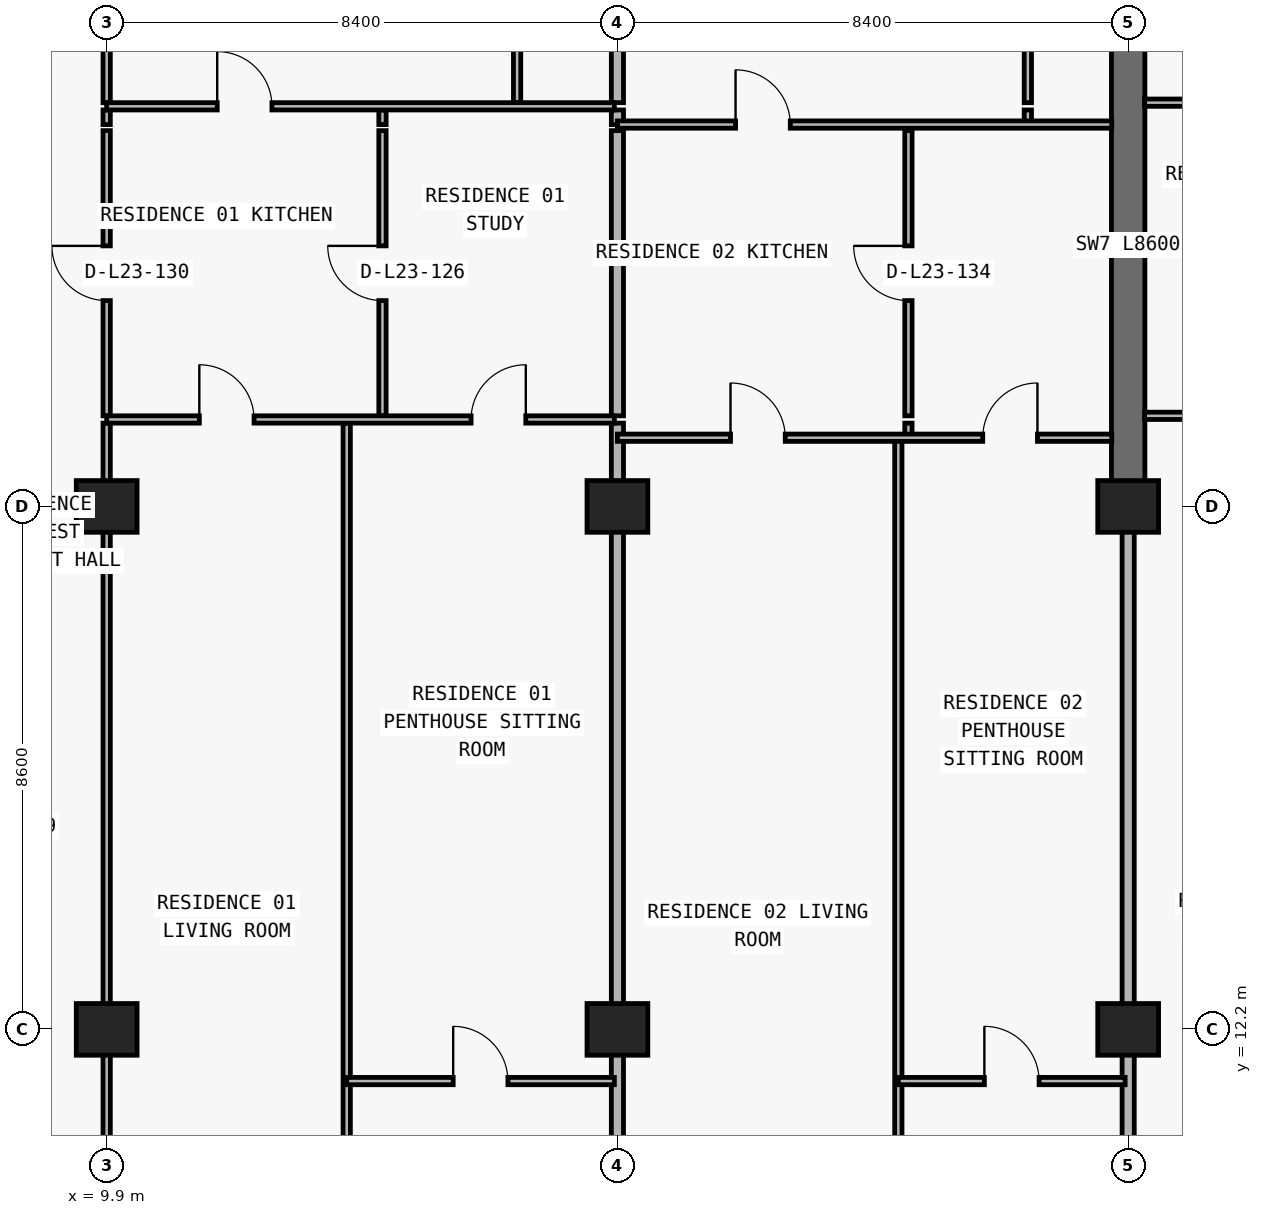
"""IFC4 building model, lengths in metres.
Left out: names, types, materials, properties, quantities, classifications, styles, units other than length and angle.
Written with IfcOpenShell. Run it as: python <this file> out.ifc"""

import sys

from ifc_helpers import new_model, si_unit, direction, frame, frame_2d, origin, origin_2d, place, context, subcontext, project, spatial, rectangle, extrude, element, fill, save


model = new_model("IFC4")
c1 = context("Model", 3, precision=1e-05, world=origin(), true_north=direction((0.0, 1.0)))
c2 = subcontext(c1, "Body", "Model", "MODEL_VIEW")
j1 = project(units=[si_unit("LENGTHUNIT", "METRE"), si_unit("PLANEANGLEUNIT", "RADIAN")], contexts=[c1])
p1 = place(None, origin())
s1 = spatial("IfcSite", under=j1, at=p1, CompositionType="ELEMENT")
p2 = place(p1, origin())
s2 = spatial("IfcBuilding", under=s1, at=p2, CompositionType="ELEMENT")
p3 = place(p2, frame((0.0, 0.0, 87.9)))
s3 = spatial("IfcBuildingStorey", under=s2, at=p3, CompositionType="ELEMENT", Elevation=87.9)
for number, where, z_axis, x_axis in (
    (1, (9.9, 12.2, 0.0), (0.0, 0.0, 1.0), (1.0, 0.0, 0.0)),
    (2, (18.3, 12.2, 0.0), (0.0, 0.0, 1.0), (1.0, 0.0, 0.0)),
    (3, (26.7, 12.2, 0.0), (0.0, 0.0, 1.0), (1.0, 0.0, 0.0)),
    (4, (9.9, 20.8, 0.0), (0.0, 0.0, 1.0), (1.0, 0.0, 0.0)),
    (5, (18.3, 20.8, 0.0), (0.0, 0.0, 1.0), (1.0, 0.0, 0.0)),
    (6, (26.7, 20.8, 0.0), (0.0, 0.0, 1.0), (1.0, 0.0, 0.0)),
):
    element("IfcColumn", number, at=place(p3, frame(where, z_axis=z_axis, x_axis=x_axis)), inside=s3, PredefinedType="COLUMN", context=c2, shape_type="SweptSolid", body=[
        extrude(rectangle(XDim=1.0, YDim=0.85, at=origin_2d()), origin(), (0.0, 0.0, 1.0), 3.05),
    ])
p4 = place(p3, frame((26.7, 20.8, 0.0), z_axis=(0.0, 0.0, 1.0), x_axis=(0.0, 1.0, 0.0)))
e7 = element("IfcWall", 7, at=p4, inside=s3, PredefinedType="SHEAR", context=c2, shape_type="SweptSolid", body=[
    extrude(rectangle(XDim=8.6, YDim=0.55, at=frame_2d((4.3, 0.0))), origin(), (0.0, 0.0, 1.0), 3.05),
])
p5 = place(p3, frame((9.9, 8.84, 0.0), z_axis=(0.0, 0.0, 1.0), x_axis=(0.0, 1.0, 0.0)))
e8 = element("IfcWall", 8, at=p5, inside=s3, PredefinedType="PARTITIONING", context=c2, shape_type="SweptSolid", body=[
    extrude(rectangle(XDim=13.33, YDim=0.12, at=frame_2d((6.665, 0.0))), origin(), (0.0, 0.0, 1.0), 2.174),
])
p6 = place(p3, frame((9.9, 22.29, 0.0), z_axis=(0.0, 0.0, 1.0), x_axis=(0.0, 1.0, 0.0)))
e9 = element("IfcWall", 9, at=p6, inside=s3, PredefinedType="PARTITIONING", context=c2, shape_type="SweptSolid", body=[
    extrude(rectangle(XDim=4.69, YDim=0.12, at=frame_2d((2.345, 0.0))), origin(), (0.0, 0.0, 1.0), 2.174),
])
p7 = place(p6, frame((1.895, 0.0, 0.0)))
e10 = element("IfcOpeningElement", 10, at=p7, cuts=e9, PredefinedType="OPENING", context=c2, shape_type="SweptSolid", body=[
    extrude(rectangle(XDim=0.9, YDim=2.124, at=frame_2d((0.45, 1.062))), frame((0.0, 0.07, 0.0), z_axis=(0.0, -1.0, 0.0), x_axis=(1.0, 0.0, 0.0)), (0.0, 0.0, 1.0), 0.14),
])
p8 = place(p3, frame((9.9, 27.08, 0.0), z_axis=(0.0, 0.0, 1.0), x_axis=(0.0, 1.0, 0.0)))
e11 = element("IfcWall", 11, at=p8, inside=s3, PredefinedType="PARTITIONING", context=c2, shape_type="SweptSolid", body=[
    extrude(rectangle(XDim=0.24, YDim=0.12, at=frame_2d((0.12, 0.0))), origin(), (0.0, 0.0, 1.0), 2.174),
])
p9 = place(p3, frame((9.9, 27.44, 0.0), z_axis=(0.0, 0.0, 1.0), x_axis=(0.0, 1.0, 0.0)))
e12 = element("IfcWall", 12, at=p9, inside=s3, PredefinedType="PARTITIONING", context=c2, shape_type="SweptSolid", body=[
    extrude(rectangle(XDim=6.96, YDim=0.12, at=frame_2d((3.48, 0.0))), origin(), (0.0, 0.0, 1.0), 2.174),
])
p10 = place(p3, frame((13.848, 8.84, 0.0), z_axis=(0.0, 0.0, 1.0), x_axis=(0.0, 1.0, 0.0)))
e13 = element("IfcWall", 13, at=p10, inside=s3, PredefinedType="PARTITIONING", context=c2, shape_type="SweptSolid", body=[
    extrude(rectangle(XDim=13.33, YDim=0.12, at=frame_2d((6.665, 0.0))), origin(), (0.0, 0.0, 1.0), 3.05),
])
p11 = place(p3, frame((14.436, 22.29, 0.0), z_axis=(0.0, 0.0, 1.0), x_axis=(0.0, 1.0, 0.0)))
e14 = element("IfcWall", 14, at=p11, inside=s3, PredefinedType="PARTITIONING", context=c2, shape_type="SweptSolid", body=[
    extrude(rectangle(XDim=4.69, YDim=0.12, at=frame_2d((2.345, 0.0))), origin(), (0.0, 0.0, 1.0), 3.05),
])
p12 = place(p11, frame((1.895, 0.0, 0.0)))
e15 = element("IfcOpeningElement", 15, at=p12, cuts=e14, PredefinedType="OPENING", context=c2, shape_type="SweptSolid", body=[
    extrude(rectangle(XDim=0.9, YDim=2.15, at=frame_2d((0.45, 1.075))), frame((0.0, 0.07, 0.0), z_axis=(0.0, -1.0, 0.0), x_axis=(1.0, 0.0, 0.0)), (0.0, 0.0, 1.0), 0.14),
])
p13 = place(p3, frame((14.436, 27.08, 0.0), z_axis=(0.0, 0.0, 1.0), x_axis=(0.0, 1.0, 0.0)))
e16 = element("IfcWall", 16, at=p13, inside=s3, PredefinedType="PARTITIONING", context=c2, shape_type="SweptSolid", body=[
    extrude(rectangle(XDim=0.24, YDim=0.12, at=frame_2d((0.12, 0.0))), origin(), (0.0, 0.0, 1.0), 3.05),
])
p14 = place(p3, frame((16.65, 27.44, 0.0), z_axis=(0.0, 0.0, 1.0), x_axis=(0.0, 1.0, 0.0)))
e17 = element("IfcWall", 17, at=p14, inside=s3, PredefinedType="PARTITIONING", context=c2, shape_type="SweptSolid", body=[
    extrude(rectangle(XDim=6.96, YDim=0.12, at=frame_2d((3.48, 0.0))), origin(), (0.0, 0.0, 1.0), 3.05),
])
p15 = place(p14, frame((3.055, 0.0, 0.0)))
e18 = element("IfcOpeningElement", 18, at=p15, cuts=e17, PredefinedType="OPENING", context=c2, shape_type="SweptSolid", body=[
    extrude(rectangle(XDim=0.85, YDim=2.1, at=frame_2d((0.425, 1.05))), frame((0.0, 0.07, 0.0), z_axis=(0.0, -1.0, 0.0), x_axis=(1.0, 0.0, 0.0)), (0.0, 0.0, 1.0), 0.14),
])
p16 = place(p3, frame((18.3, 8.84, 0.0), z_axis=(0.0, 0.0, 1.0), x_axis=(0.0, 1.0, 0.0)))
e19 = element("IfcWall", 19, at=p16, inside=s3, PredefinedType="PARTITIONING", context=c2, shape_type="SweptSolid", body=[
    extrude(rectangle(XDim=13.33, YDim=0.2, at=frame_2d((6.665, 0.0))), origin(), (0.0, 0.0, 1.0), 2.174),
])
p17 = place(p3, frame((18.3, 22.29, 0.0), z_axis=(0.0, 0.0, 1.0), x_axis=(0.0, 1.0, 0.0)))
e20 = element("IfcWall", 20, at=p17, inside=s3, PredefinedType="PARTITIONING", context=c2, shape_type="SweptSolid", body=[
    extrude(rectangle(XDim=4.69, YDim=0.2, at=frame_2d((2.345, 0.0))), origin(), (0.0, 0.0, 1.0), 2.174),
])
p18 = place(p3, frame((18.3, 27.08, 0.0), z_axis=(0.0, 0.0, 1.0), x_axis=(0.0, 1.0, 0.0)))
e21 = element("IfcWall", 21, at=p18, inside=s3, PredefinedType="PARTITIONING", context=c2, shape_type="SweptSolid", body=[
    extrude(rectangle(XDim=0.24, YDim=0.2, at=frame_2d((0.12, 0.0))), origin(), (0.0, 0.0, 1.0), 2.174),
])
p19 = place(p3, frame((18.3, 27.44, 0.0), z_axis=(0.0, 0.0, 1.0), x_axis=(0.0, 1.0, 0.0)))
e22 = element("IfcWall", 22, at=p19, inside=s3, PredefinedType="PARTITIONING", context=c2, shape_type="SweptSolid", body=[
    extrude(rectangle(XDim=6.96, YDim=0.2, at=frame_2d((3.48, 0.0))), origin(), (0.0, 0.0, 1.0), 2.174),
])
p20 = place(p3, frame((22.92, 8.84, 0.0), z_axis=(0.0, 0.0, 1.0), x_axis=(0.0, 1.0, 0.0)))
e23 = element("IfcWall", 23, at=p20, inside=s3, PredefinedType="PARTITIONING", context=c2, shape_type="SweptSolid", body=[
    extrude(rectangle(XDim=13.09, YDim=0.12, at=frame_2d((6.545, 0.0))), origin(), (0.0, 0.0, 1.0), 3.05),
])
p21 = place(p3, frame((23.086, 21.935, 0.0), z_axis=(0.0, 0.0, 1.0), x_axis=(0.0, 1.0, 0.0)))
e24 = element("IfcWall", 24, at=p21, inside=s3, PredefinedType="PARTITIONING", context=c2, shape_type="SweptSolid", body=[
    extrude(rectangle(XDim=0.235, YDim=0.12, at=frame_2d((0.117, 0.0))), origin(), (0.0, 0.0, 1.0), 3.05),
])
p22 = place(p3, frame((23.086, 22.29, 0.0), z_axis=(0.0, 0.0, 1.0), x_axis=(0.0, 1.0, 0.0)))
e25 = element("IfcWall", 25, at=p22, inside=s3, PredefinedType="PARTITIONING", context=c2, shape_type="SweptSolid", body=[
    extrude(rectangle(XDim=4.69, YDim=0.12, at=frame_2d((2.345, 0.0))), origin(), (0.0, 0.0, 1.0), 3.05),
])
p23 = place(p22, frame((1.895, 0.0, 0.0)))
e26 = element("IfcOpeningElement", 26, at=p23, cuts=e25, PredefinedType="OPENING", context=c2, shape_type="SweptSolid", body=[
    extrude(rectangle(XDim=0.9, YDim=2.15, at=frame_2d((0.45, 1.075))), frame((0.0, 0.07, 0.0), z_axis=(0.0, -1.0, 0.0), x_axis=(1.0, 0.0, 0.0)), (0.0, 0.0, 1.0), 0.14),
])
p24 = place(p3, frame((25.05, 27.08, 0.0), z_axis=(0.0, 0.0, 1.0), x_axis=(0.0, 1.0, 0.0)))
e27 = element("IfcWall", 27, at=p24, inside=s3, PredefinedType="PARTITIONING", context=c2, shape_type="SweptSolid", body=[
    extrude(rectangle(XDim=0.24, YDim=0.12, at=frame_2d((0.12, 0.0))), origin(), (0.0, 0.0, 1.0), 3.05),
])
p25 = place(p3, frame((25.05, 27.44, 0.0), z_axis=(0.0, 0.0, 1.0), x_axis=(0.0, 1.0, 0.0)))
e28 = element("IfcWall", 28, at=p25, inside=s3, PredefinedType="PARTITIONING", context=c2, shape_type="SweptSolid", body=[
    extrude(rectangle(XDim=6.96, YDim=0.12, at=frame_2d((3.48, 0.0))), origin(), (0.0, 0.0, 1.0), 3.05),
])
p26 = place(p25, frame((3.055, 0.0, 0.0)))
e29 = element("IfcOpeningElement", 29, at=p26, cuts=e28, PredefinedType="OPENING", context=c2, shape_type="SweptSolid", body=[
    extrude(rectangle(XDim=0.85, YDim=2.1, at=frame_2d((0.425, 1.05))), frame((0.0, 0.07, 0.0), z_axis=(0.0, -1.0, 0.0), x_axis=(1.0, 0.0, 0.0)), (0.0, 0.0, 1.0), 0.14),
])
p27 = place(p3, frame((26.7, 8.84, 0.0), z_axis=(0.0, 0.0, 1.0), x_axis=(0.0, 1.0, 0.0)))
e30 = element("IfcWall", 30, at=p27, inside=s3, PredefinedType="PARTITIONING", context=c2, shape_type="SweptSolid", body=[
    extrude(rectangle(XDim=11.955, YDim=0.2, at=frame_2d((5.978, 0.0))), origin(), (0.0, 0.0, 1.0), 2.174),
])
p28 = place(p3, frame((13.848, 11.35, 0.0), z_axis=(0.0, 0.0, 1.0), x_axis=(1.0, 0.0, 0.0)))
e31 = element("IfcWall", 31, at=p28, inside=s3, PredefinedType="PARTITIONING", context=c2, shape_type="SweptSolid", body=[
    extrude(rectangle(XDim=4.402, YDim=0.12, at=frame_2d((2.201, 0.0))), origin(), (0.0, 0.0, 1.0), 3.05),
])
p29 = place(p28, frame((1.751, 0.0, 0.0)))
e32 = element("IfcOpeningElement", 32, at=p29, cuts=e31, PredefinedType="OPENING", context=c2, shape_type="SweptSolid", body=[
    extrude(rectangle(XDim=0.9, YDim=2.15, at=frame_2d((0.45, 1.075))), frame((0.0, 0.07, 0.0), z_axis=(0.0, -1.0, 0.0), x_axis=(1.0, 0.0, 0.0)), (0.0, 0.0, 1.0), 0.14),
])
p30 = place(p3, frame((22.92, 11.35, 0.0), z_axis=(0.0, 0.0, 1.0), x_axis=(1.0, 0.0, 0.0)))
e33 = element("IfcWall", 33, at=p30, inside=s3, PredefinedType="PARTITIONING", context=c2, shape_type="SweptSolid", body=[
    extrude(rectangle(XDim=3.73, YDim=0.12, at=frame_2d((1.865, 0.0))), origin(), (0.0, 0.0, 1.0), 3.05),
])
p31 = place(p30, frame((1.415, 0.0, 0.0)))
e34 = element("IfcOpeningElement", 34, at=p31, cuts=e33, PredefinedType="OPENING", context=c2, shape_type="SweptSolid", body=[
    extrude(rectangle(XDim=0.9, YDim=2.15, at=frame_2d((0.45, 1.075))), frame((0.0, 0.07, 0.0), z_axis=(0.0, -1.0, 0.0), x_axis=(1.0, 0.0, 0.0)), (0.0, 0.0, 1.0), 0.14),
])
p32 = place(p3, frame((18.3, 21.93, 0.0), z_axis=(0.0, 0.0, 1.0), x_axis=(1.0, 0.0, 0.0)))
e35 = element("IfcWall", 35, at=p32, inside=s3, PredefinedType="PARTITIONING", context=c2, shape_type="SweptSolid", body=[
    extrude(rectangle(XDim=8.13, YDim=0.12, at=frame_2d((4.065, 0.0))), origin(), (0.0, 0.0, 1.0), 3.05),
])
p33 = place(p32, frame((1.86, 0.0, 0.0)))
e36 = element("IfcOpeningElement", 36, at=p33, cuts=e35, PredefinedType="OPENING", context=c2, shape_type="SweptSolid", body=[
    extrude(rectangle(XDim=0.9, YDim=2.15, at=frame_2d((0.45, 1.075))), frame((0.0, 0.07, 0.0), z_axis=(0.0, -1.0, 0.0), x_axis=(1.0, 0.0, 0.0)), (0.0, 0.0, 1.0), 0.14),
])
p34 = place(p32, frame((6.008, 0.0, 0.0)))
e37 = element("IfcOpeningElement", 37, at=p34, cuts=e35, PredefinedType="OPENING", context=c2, shape_type="SweptSolid", body=[
    extrude(rectangle(XDim=0.9, YDim=2.15, at=frame_2d((0.45, 1.075))), frame((0.0, 0.07, 0.0), z_axis=(0.0, -1.0, 0.0), x_axis=(1.0, 0.0, 0.0)), (0.0, 0.0, 1.0), 0.14),
])
p35 = place(p3, frame((9.9, 22.23, 0.0), z_axis=(0.0, 0.0, 1.0), x_axis=(1.0, 0.0, 0.0)))
e38 = element("IfcWall", 38, at=p35, inside=s3, PredefinedType="PARTITIONING", context=c2, shape_type="SweptSolid", body=[
    extrude(rectangle(XDim=8.35, YDim=0.12, at=frame_2d((4.175, 0.0))), origin(), (0.0, 0.0, 1.0), 3.05),
])
p36 = place(p35, frame((1.524, 0.0, 0.0)))
e39 = element("IfcOpeningElement", 39, at=p36, cuts=e38, PredefinedType="OPENING", context=c2, shape_type="SweptSolid", body=[
    extrude(rectangle(XDim=0.9, YDim=2.15, at=frame_2d((0.45, 1.075))), frame((0.0, 0.07, 0.0), z_axis=(0.0, -1.0, 0.0), x_axis=(1.0, 0.0, 0.0)), (0.0, 0.0, 1.0), 0.14),
])
p37 = place(p35, frame((5.993, 0.0, 0.0)))
e40 = element("IfcOpeningElement", 40, at=p37, cuts=e38, PredefinedType="OPENING", context=c2, shape_type="SweptSolid", body=[
    extrude(rectangle(XDim=0.9, YDim=2.15, at=frame_2d((0.45, 1.075))), frame((0.0, 0.07, 0.0), z_axis=(0.0, -1.0, 0.0), x_axis=(1.0, 0.0, 0.0)), (0.0, 0.0, 1.0), 0.14),
])
p38 = place(p3, frame((26.97, 22.29, 0.0), z_axis=(0.0, 0.0, 1.0), x_axis=(1.0, 0.0, 0.0)))
e41 = element("IfcWall", 41, at=p38, inside=s3, PredefinedType="PARTITIONING", context=c2, shape_type="SweptSolid", body=[
    extrude(rectangle(XDim=8.125, YDim=0.12, at=frame_2d((4.062, 0.0))), origin(), (0.0, 0.0, 1.0), 3.05),
])
p39 = place(p38, frame((1.389, 0.0, 0.0)))
e42 = element("IfcOpeningElement", 42, at=p39, cuts=e41, PredefinedType="OPENING", context=c2, shape_type="SweptSolid", body=[
    extrude(rectangle(XDim=0.9, YDim=2.15, at=frame_2d((0.45, 1.075))), frame((0.0, 0.07, 0.0), z_axis=(0.0, -1.0, 0.0), x_axis=(1.0, 0.0, 0.0)), (0.0, 0.0, 1.0), 0.14),
])
p40 = place(p38, frame((5.621, 0.0, 0.0)))
e43 = element("IfcOpeningElement", 43, at=p40, cuts=e41, PredefinedType="OPENING", context=c2, shape_type="SweptSolid", body=[
    extrude(rectangle(XDim=0.9, YDim=2.15, at=frame_2d((0.45, 1.075))), frame((0.0, 0.07, 0.0), z_axis=(0.0, -1.0, 0.0), x_axis=(1.0, 0.0, 0.0)), (0.0, 0.0, 1.0), 0.14),
])
p41 = place(p3, frame((18.3, 27.08, 0.0), z_axis=(0.0, 0.0, 1.0), x_axis=(1.0, 0.0, 0.0)))
e44 = element("IfcWall", 44, at=p41, inside=s3, PredefinedType="PARTITIONING", context=c2, shape_type="SweptSolid", body=[
    extrude(rectangle(XDim=8.13, YDim=0.12, at=frame_2d((4.065, 0.0))), origin(), (0.0, 0.0, 1.0), 3.05),
])
p42 = place(p41, frame((1.943, 0.0, 0.0)))
e45 = element("IfcOpeningElement", 45, at=p42, cuts=e44, PredefinedType="OPENING", context=c2, shape_type="SweptSolid", body=[
    extrude(rectangle(XDim=0.9, YDim=2.15, at=frame_2d((0.45, 1.075))), frame((0.0, 0.07, 0.0), z_axis=(0.0, -1.0, 0.0), x_axis=(1.0, 0.0, 0.0)), (0.0, 0.0, 1.0), 0.14),
])
p43 = place(p3, frame((9.9, 27.38, 0.0), z_axis=(0.0, 0.0, 1.0), x_axis=(1.0, 0.0, 0.0)))
e46 = element("IfcWall", 46, at=p43, inside=s3, PredefinedType="PARTITIONING", context=c2, shape_type="SweptSolid", body=[
    extrude(rectangle(XDim=8.35, YDim=0.12, at=frame_2d((4.175, 0.0))), origin(), (0.0, 0.0, 1.0), 3.05),
])
p44 = place(p43, frame((1.818, 0.0, 0.0)))
e47 = element("IfcOpeningElement", 47, at=p44, cuts=e46, PredefinedType="OPENING", context=c2, shape_type="SweptSolid", body=[
    extrude(rectangle(XDim=0.9, YDim=2.15, at=frame_2d((0.45, 1.075))), frame((0.0, 0.07, 0.0), z_axis=(0.0, -1.0, 0.0), x_axis=(1.0, 0.0, 0.0)), (0.0, 0.0, 1.0), 0.14),
])
p45 = place(p3, frame((26.97, 27.44, 0.0), z_axis=(0.0, 0.0, 1.0), x_axis=(1.0, 0.0, 0.0)))
e48 = element("IfcWall", 48, at=p45, inside=s3, PredefinedType="PARTITIONING", context=c2, shape_type="SweptSolid", body=[
    extrude(rectangle(XDim=8.13, YDim=0.12, at=frame_2d((4.065, 0.0))), origin(), (0.0, 0.0, 1.0), 3.05),
])
p46 = place(p45, frame((1.558, 0.0, 0.0)))
e49 = element("IfcOpeningElement", 49, at=p46, cuts=e48, PredefinedType="OPENING", context=c2, shape_type="SweptSolid", body=[
    extrude(rectangle(XDim=0.9, YDim=2.15, at=frame_2d((0.45, 1.075))), frame((0.0, 0.07, 0.0), z_axis=(0.0, -1.0, 0.0), x_axis=(1.0, 0.0, 0.0)), (0.0, 0.0, 1.0), 0.14),
])
p47 = place(p44, origin())
e50 = element("IfcDoor", 50, at=p47, inside=s3, OperationType="SINGLE_SWING_LEFT", PredefinedType="DOOR", context=c2, shape_type="SweptSolid", body=[
    extrude(rectangle(XDim=0.9, YDim=2.15, at=frame_2d((0.45, 1.075))), frame((0.0, 0.025, 0.0), z_axis=(0.0, -1.0, 0.0), x_axis=(1.0, 0.0, 0.0)), (0.0, 0.0, 1.0), 0.05),
])
fill(e47, e50)
p48 = place(p12, origin())
e51 = element("IfcDoor", 51, at=p48, inside=s3, OperationType="SINGLE_SWING_RIGHT", PredefinedType="DOOR", context=c2, shape_type="SweptSolid", body=[
    extrude(rectangle(XDim=0.9, YDim=2.15, at=frame_2d((0.45, 1.075))), frame((0.0, 0.025, 0.0), z_axis=(0.0, -1.0, 0.0), x_axis=(1.0, 0.0, 0.0)), (0.0, 0.0, 1.0), 0.05),
])
fill(e15, e51)
p49 = place(p36, origin())
e52 = element("IfcDoor", 52, at=p49, inside=s3, OperationType="SINGLE_SWING_LEFT", PredefinedType="DOOR", context=c2, shape_type="SweptSolid", body=[
    extrude(rectangle(XDim=0.9, YDim=2.15, at=frame_2d((0.45, 1.075))), frame((0.0, 0.025, 0.0), z_axis=(0.0, -1.0, 0.0), x_axis=(1.0, 0.0, 0.0)), (0.0, 0.0, 1.0), 0.05),
])
fill(e39, e52)
p50 = place(p37, origin())
e53 = element("IfcDoor", 53, at=p50, inside=s3, OperationType="SINGLE_SWING_RIGHT", PredefinedType="DOOR", context=c2, shape_type="SweptSolid", body=[
    extrude(rectangle(XDim=0.9, YDim=2.15, at=frame_2d((0.45, 1.075))), frame((0.0, 0.025, 0.0), z_axis=(0.0, -1.0, 0.0), x_axis=(1.0, 0.0, 0.0)), (0.0, 0.0, 1.0), 0.05),
])
fill(e40, e53)
p51 = place(p29, origin())
e54 = element("IfcDoor", 54, at=p51, inside=s3, OperationType="SINGLE_SWING_LEFT", PredefinedType="DOOR", context=c2, shape_type="SweptSolid", body=[
    extrude(rectangle(XDim=0.9, YDim=2.15, at=frame_2d((0.45, 1.075))), frame((0.0, 0.025, 0.0), z_axis=(0.0, -1.0, 0.0), x_axis=(1.0, 0.0, 0.0)), (0.0, 0.0, 1.0), 0.05),
])
fill(e32, e54)
p52 = place(p7, origin())
e55 = element("IfcDoor", 55, at=p52, inside=s3, OperationType="SINGLE_SWING_RIGHT", PredefinedType="DOOR", context=c2, shape_type="SweptSolid", body=[
    extrude(rectangle(XDim=0.9, YDim=2.124, at=frame_2d((0.45, 1.062))), frame((0.0, 0.025, 0.0), z_axis=(0.0, -1.0, 0.0), x_axis=(1.0, 0.0, 0.0)), (0.0, 0.0, 1.0), 0.05),
])
fill(e10, e55)
p53 = place(p42, origin())
e56 = element("IfcDoor", 56, at=p53, inside=s3, OperationType="SINGLE_SWING_LEFT", PredefinedType="DOOR", context=c2, shape_type="SweptSolid", body=[
    extrude(rectangle(XDim=0.9, YDim=2.15, at=frame_2d((0.45, 1.075))), frame((0.0, 0.025, 0.0), z_axis=(0.0, -1.0, 0.0), x_axis=(1.0, 0.0, 0.0)), (0.0, 0.0, 1.0), 0.05),
])
fill(e45, e56)
p54 = place(p23, origin())
e57 = element("IfcDoor", 57, at=p54, inside=s3, OperationType="SINGLE_SWING_RIGHT", PredefinedType="DOOR", context=c2, shape_type="SweptSolid", body=[
    extrude(rectangle(XDim=0.9, YDim=2.15, at=frame_2d((0.45, 1.075))), frame((0.0, 0.025, 0.0), z_axis=(0.0, -1.0, 0.0), x_axis=(1.0, 0.0, 0.0)), (0.0, 0.0, 1.0), 0.05),
])
fill(e26, e57)
p55 = place(p33, origin())
e58 = element("IfcDoor", 58, at=p55, inside=s3, OperationType="SINGLE_SWING_LEFT", PredefinedType="DOOR", context=c2, shape_type="SweptSolid", body=[
    extrude(rectangle(XDim=0.9, YDim=2.15, at=frame_2d((0.45, 1.075))), frame((0.0, 0.025, 0.0), z_axis=(0.0, -1.0, 0.0), x_axis=(1.0, 0.0, 0.0)), (0.0, 0.0, 1.0), 0.05),
])
fill(e36, e58)
p56 = place(p34, origin())
e59 = element("IfcDoor", 59, at=p56, inside=s3, OperationType="SINGLE_SWING_RIGHT", PredefinedType="DOOR", context=c2, shape_type="SweptSolid", body=[
    extrude(rectangle(XDim=0.9, YDim=2.15, at=frame_2d((0.45, 1.075))), frame((0.0, 0.025, 0.0), z_axis=(0.0, -1.0, 0.0), x_axis=(1.0, 0.0, 0.0)), (0.0, 0.0, 1.0), 0.05),
])
fill(e37, e59)
p57 = place(p31, origin())
e60 = element("IfcDoor", 60, at=p57, inside=s3, OperationType="SINGLE_SWING_LEFT", PredefinedType="DOOR", context=c2, shape_type="SweptSolid", body=[
    extrude(rectangle(XDim=0.9, YDim=2.15, at=frame_2d((0.45, 1.075))), frame((0.0, 0.025, 0.0), z_axis=(0.0, -1.0, 0.0), x_axis=(1.0, 0.0, 0.0)), (0.0, 0.0, 1.0), 0.05),
])
fill(e34, e60)
save(model, sys.argv[1])
